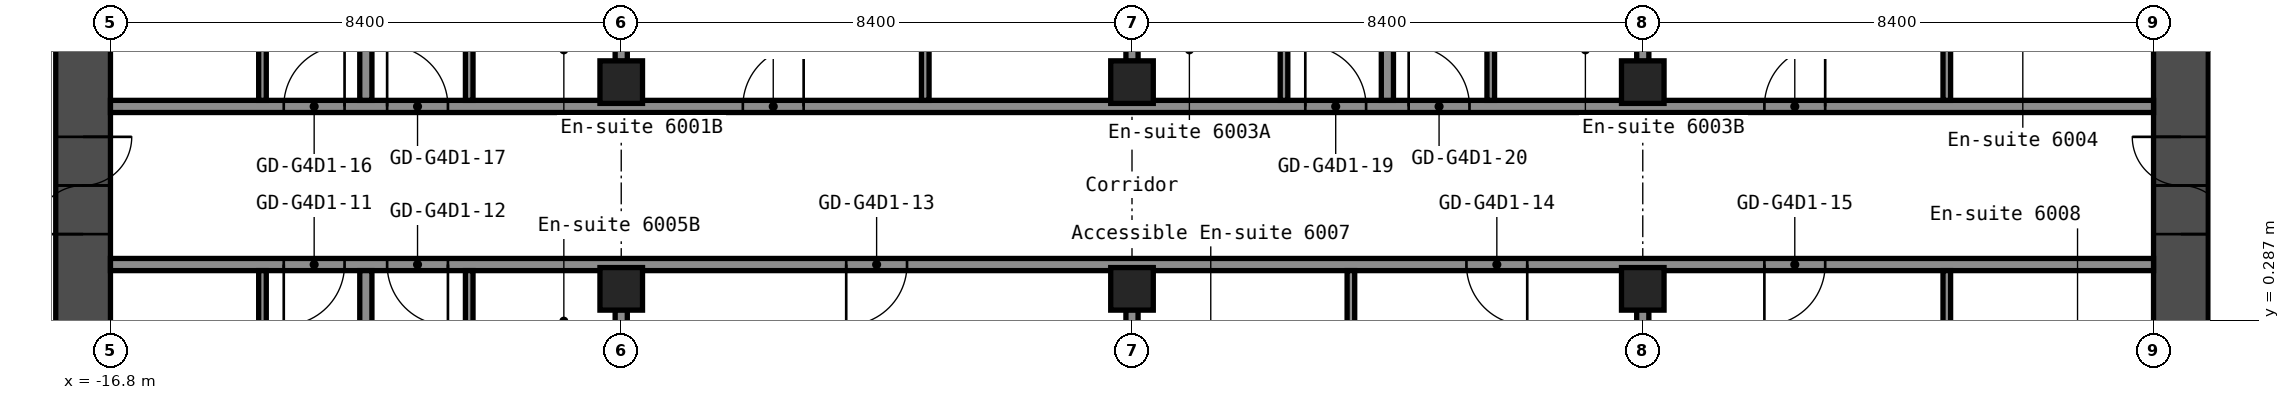
"""IFC4 building model, lengths in metres.
Left out: names, types, materials, properties, quantities, classifications, styles, units other than length and angle.
Written with IfcOpenShell. Run it as: python <this file> out.ifc"""

import sys

from ifc_helpers import new_model, si_unit, direction, frame, frame_2d, origin, origin_2d, place, context, subcontext, project, spatial, rectangle, hollow_rectangle, extrude, element, fill, save


model = new_model("IFC4")
c1 = context("Model", 3, precision=1e-05, world=origin(), true_north=direction((0.0, 1.0)))
c2 = subcontext(c1, "Body", "Model", "MODEL_VIEW")
j1 = project(units=[si_unit("LENGTHUNIT", "METRE"), si_unit("PLANEANGLEUNIT", "RADIAN")], contexts=[c1])
p1 = place(None, origin())
s1 = spatial("IfcSite", under=j1, at=p1, CompositionType="ELEMENT")
p2 = place(p1, origin())
s2 = spatial("IfcBuilding", under=s1, at=p2, CompositionType="ELEMENT")
p3 = place(p2, frame((0.0, 0.0, 212.2)))
s3 = spatial("IfcBuildingStorey", under=s2, at=p3, CompositionType="ELEMENT", Elevation=212.2)
for number, where, z_axis, x_axis in (
    (1, (-8.4, 0.8, 0.0), (0.0, 0.0, 1.0), (1.0, 0.0, 0.0)),
    (2, (-8.4, 4.2, 0.0), (0.0, 0.0, 1.0), (1.0, 0.0, 0.0)),
    (3, (0.0, 0.8, 0.0), (0.0, 0.0, 1.0), (1.0, 0.0, 0.0)),
    (4, (0.0, 4.2, 0.0), (0.0, 0.0, 1.0), (1.0, 0.0, 0.0)),
    (5, (8.4, 0.8, 0.0), (0.0, 0.0, 1.0), (1.0, 0.0, 0.0)),
    (6, (8.4, 4.2, 0.0), (0.0, 0.0, 1.0), (1.0, 0.0, 0.0)),
):
    element("IfcColumn", number, at=place(p3, frame(where, z_axis=z_axis, x_axis=x_axis)), inside=s3, PredefinedType="COLUMN", context=c2, shape_type="SweptSolid", body=[
        extrude(hollow_rectangle(XDim=0.7, YDim=0.7, WallThickness=0.028, at=origin_2d()), origin(), (0.0, 0.0, 1.0), 2.75),
    ])
p4 = place(p3, frame((-17.25, -8.4, 0.0), z_axis=(0.0, 0.0, 1.0), x_axis=(0.0, 1.0, 0.0)))
e7 = element("IfcWall", 7, at=p4, inside=s3, PredefinedType="SHEAR", context=c2, shape_type="SweptSolid", body=[
    extrude(rectangle(XDim=16.8, YDim=0.9, at=frame_2d((8.4, 0.0))), origin(), (0.0, 0.0, 1.0), 2.75),
])
p5 = place(p4, frame((10.1, 0.0, 0.0)))
e8 = element("IfcOpeningElement", 8, at=p5, cuts=e7, PredefinedType="OPENING", context=c2, shape_type="SweptSolid", body=[
    extrude(rectangle(XDim=1.6, YDim=2.1, at=frame_2d((0.8, 1.05))), frame((0.0, 0.46, 0.0), z_axis=(0.0, -1.0, 0.0), x_axis=(1.0, 0.0, 0.0)), (0.0, 0.0, 1.0), 0.92),
])
p6 = place(p3, frame((17.25, -8.4, 0.0), z_axis=(0.0, 0.0, 1.0), x_axis=(0.0, 1.0, 0.0)))
e9 = element("IfcWall", 9, at=p6, inside=s3, PredefinedType="SHEAR", context=c2, shape_type="SweptSolid", body=[
    extrude(rectangle(XDim=16.8, YDim=0.9, at=frame_2d((8.4, 0.0))), origin(), (0.0, 0.0, 1.0), 2.75),
])
p7 = place(p6, frame((10.1, 0.0, 0.0)))
e10 = element("IfcOpeningElement", 10, at=p7, cuts=e9, PredefinedType="OPENING", context=c2, shape_type="SweptSolid", body=[
    extrude(rectangle(XDim=1.6, YDim=2.1, at=frame_2d((0.8, 1.05))), frame((0.0, 0.46, 0.0), z_axis=(0.0, -1.0, 0.0), x_axis=(1.0, 0.0, 0.0)), (0.0, 0.0, 1.0), 0.92),
])
p8 = place(p3, frame((-16.8, 1.2, 0.0), z_axis=(0.0, 0.0, 1.0), x_axis=(1.0, 0.0, 0.0)))
e11 = element("IfcWall", 11, at=p8, inside=s3, PredefinedType="PARTITIONING", context=c2, shape_type="SweptSolid", body=[
    extrude(rectangle(XDim=33.6, YDim=0.2, at=frame_2d((16.8, 0.0))), origin(), (0.0, 0.0, 1.0), 2.75),
])
p9 = place(p8, frame((2.85, 0.0, 0.0)))
e12 = element("IfcOpeningElement", 12, at=p9, cuts=e11, PredefinedType="OPENING", context=c2, shape_type="SweptSolid", body=[
    extrude(rectangle(XDim=1.0, YDim=2.1, at=frame_2d((0.5, 1.05))), frame((0.0, 0.11, 0.0), z_axis=(0.0, -1.0, 0.0), x_axis=(1.0, 0.0, 0.0)), (0.0, 0.0, 1.0), 0.22),
])
p10 = place(p8, frame((4.55, 0.0, 0.0)))
e13 = element("IfcOpeningElement", 13, at=p10, cuts=e11, PredefinedType="OPENING", context=c2, shape_type="SweptSolid", body=[
    extrude(rectangle(XDim=1.0, YDim=2.1, at=frame_2d((0.5, 1.05))), frame((0.0, 0.11, 0.0), z_axis=(0.0, -1.0, 0.0), x_axis=(1.0, 0.0, 0.0)), (0.0, 0.0, 1.0), 0.22),
])
p11 = place(p8, frame((12.1, 0.0, 0.0)))
e14 = element("IfcOpeningElement", 14, at=p11, cuts=e11, PredefinedType="OPENING", context=c2, shape_type="SweptSolid", body=[
    extrude(rectangle(XDim=1.0, YDim=2.1, at=frame_2d((0.5, 1.05))), frame((0.0, 0.11, 0.0), z_axis=(0.0, -1.0, 0.0), x_axis=(1.0, 0.0, 0.0)), (0.0, 0.0, 1.0), 0.22),
])
p12 = place(p8, frame((22.3, 0.0, 0.0)))
e15 = element("IfcOpeningElement", 15, at=p12, cuts=e11, PredefinedType="OPENING", context=c2, shape_type="SweptSolid", body=[
    extrude(rectangle(XDim=1.0, YDim=2.1, at=frame_2d((0.5, 1.05))), frame((0.0, 0.11, 0.0), z_axis=(0.0, -1.0, 0.0), x_axis=(1.0, 0.0, 0.0)), (0.0, 0.0, 1.0), 0.22),
])
p13 = place(p8, frame((27.2, 0.0, 0.0)))
e16 = element("IfcOpeningElement", 16, at=p13, cuts=e11, PredefinedType="OPENING", context=c2, shape_type="SweptSolid", body=[
    extrude(rectangle(XDim=1.0, YDim=2.1, at=frame_2d((0.5, 1.05))), frame((0.0, 0.11, 0.0), z_axis=(0.0, -1.0, 0.0), x_axis=(1.0, 0.0, 0.0)), (0.0, 0.0, 1.0), 0.22),
])
p14 = place(p3, frame((-16.8, 3.8, 0.0), z_axis=(0.0, 0.0, 1.0), x_axis=(1.0, 0.0, 0.0)))
e17 = element("IfcWall", 17, at=p14, inside=s3, PredefinedType="PARTITIONING", context=c2, shape_type="SweptSolid", body=[
    extrude(rectangle(XDim=33.6, YDim=0.2, at=frame_2d((16.8, 0.0))), origin(), (0.0, 0.0, 1.0), 2.75),
])
p15 = place(p14, frame((2.85, 0.0, 0.0)))
e18 = element("IfcOpeningElement", 18, at=p15, cuts=e17, PredefinedType="OPENING", context=c2, shape_type="SweptSolid", body=[
    extrude(rectangle(XDim=1.0, YDim=2.1, at=frame_2d((0.5, 1.05))), frame((0.0, 0.11, 0.0), z_axis=(0.0, -1.0, 0.0), x_axis=(1.0, 0.0, 0.0)), (0.0, 0.0, 1.0), 0.22),
])
p16 = place(p14, frame((4.55, 0.0, 0.0)))
e19 = element("IfcOpeningElement", 19, at=p16, cuts=e17, PredefinedType="OPENING", context=c2, shape_type="SweptSolid", body=[
    extrude(rectangle(XDim=1.0, YDim=2.1, at=frame_2d((0.5, 1.05))), frame((0.0, 0.11, 0.0), z_axis=(0.0, -1.0, 0.0), x_axis=(1.0, 0.0, 0.0)), (0.0, 0.0, 1.0), 0.22),
])
p17 = place(p14, frame((10.4, 0.0, 0.0)))
e20 = element("IfcOpeningElement", 20, at=p17, cuts=e17, PredefinedType="OPENING", context=c2, shape_type="SweptSolid", body=[
    extrude(rectangle(XDim=1.0, YDim=2.1, at=frame_2d((0.5, 1.05))), frame((0.0, 0.11, 0.0), z_axis=(0.0, -1.0, 0.0), x_axis=(1.0, 0.0, 0.0)), (0.0, 0.0, 1.0), 0.22),
])
p18 = place(p14, frame((19.65, 0.0, 0.0)))
e21 = element("IfcOpeningElement", 21, at=p18, cuts=e17, PredefinedType="OPENING", context=c2, shape_type="SweptSolid", body=[
    extrude(rectangle(XDim=1.0, YDim=2.1, at=frame_2d((0.5, 1.05))), frame((0.0, 0.11, 0.0), z_axis=(0.0, -1.0, 0.0), x_axis=(1.0, 0.0, 0.0)), (0.0, 0.0, 1.0), 0.22),
])
p19 = place(p14, frame((21.35, 0.0, 0.0)))
e22 = element("IfcOpeningElement", 22, at=p19, cuts=e17, PredefinedType="OPENING", context=c2, shape_type="SweptSolid", body=[
    extrude(rectangle(XDim=1.0, YDim=2.1, at=frame_2d((0.5, 1.05))), frame((0.0, 0.11, 0.0), z_axis=(0.0, -1.0, 0.0), x_axis=(1.0, 0.0, 0.0)), (0.0, 0.0, 1.0), 0.22),
])
p20 = place(p14, frame((27.2, 0.0, 0.0)))
e23 = element("IfcOpeningElement", 23, at=p20, cuts=e17, PredefinedType="OPENING", context=c2, shape_type="SweptSolid", body=[
    extrude(rectangle(XDim=1.0, YDim=2.1, at=frame_2d((0.5, 1.05))), frame((0.0, 0.11, 0.0), z_axis=(0.0, -1.0, 0.0), x_axis=(1.0, 0.0, 0.0)), (0.0, 0.0, 1.0), 0.22),
])
p21 = place(p3, frame((-14.3, -1.8, 0.0), z_axis=(0.0, 0.0, 1.0), x_axis=(0.0, 1.0, 0.0)))
e24 = element("IfcWall", 24, at=p21, inside=s3, PredefinedType="PARTITIONING", context=c2, shape_type="SweptSolid", body=[
    extrude(rectangle(XDim=2.9, YDim=0.125, at=frame_2d((1.45, 0.0))), origin(), (0.0, 0.0, 1.0), 2.75),
])
p22 = place(p21, frame((0.6, 0.0, 0.0)))
e25 = element("IfcOpeningElement", 25, at=p22, cuts=e24, PredefinedType="OPENING", context=c2, shape_type="SweptSolid", body=[
    extrude(rectangle(XDim=0.8, YDim=2.1, at=frame_2d((0.4, 1.05))), frame((0.0, 0.073, 0.0), z_axis=(0.0, -1.0, 0.0), x_axis=(1.0, 0.0, 0.0)), (0.0, 0.0, 1.0), 0.145),
])
p23 = place(p3, frame((-14.3, 3.9, 0.0), z_axis=(0.0, 0.0, 1.0), x_axis=(0.0, 1.0, 0.0)))
e26 = element("IfcWall", 26, at=p23, inside=s3, PredefinedType="PARTITIONING", context=c2, shape_type="SweptSolid", body=[
    extrude(rectangle(XDim=2.9, YDim=0.125, at=frame_2d((1.45, 0.0))), origin(), (0.0, 0.0, 1.0), 2.75),
])
p24 = place(p23, frame((1.5, 0.0, 0.0)))
e27 = element("IfcOpeningElement", 27, at=p24, cuts=e26, PredefinedType="OPENING", context=c2, shape_type="SweptSolid", body=[
    extrude(rectangle(XDim=0.8, YDim=2.1, at=frame_2d((0.4, 1.05))), frame((0.0, 0.073, 0.0), z_axis=(0.0, -1.0, 0.0), x_axis=(1.0, 0.0, 0.0)), (0.0, 0.0, 1.0), 0.145),
])
for number, where, z_axis, x_axis in (
    (28, (-12.6, -15.55, 0.0), (0.0, 0.0, 1.0), (0.0, 1.0, 0.0)),
    (29, (-12.6, 3.9, 0.0), (0.0, 0.0, 1.0), (0.0, 1.0, 0.0)),
):
    element("IfcWall", number, at=place(p3, frame(where, z_axis=z_axis, x_axis=x_axis)), inside=s3, PredefinedType="PARTITIONING", context=c2, shape_type="SweptSolid", body=[
        extrude(rectangle(XDim=16.65, YDim=0.2, at=frame_2d((8.325, 0.0))), origin(), (0.0, 0.0, 1.0), 2.75),
    ])
p25 = place(p3, frame((-10.9, -1.8, 0.0), z_axis=(0.0, 0.0, 1.0), x_axis=(0.0, 1.0, 0.0)))
e30 = element("IfcWall", 30, at=p25, inside=s3, PredefinedType="PARTITIONING", context=c2, shape_type="SweptSolid", body=[
    extrude(rectangle(XDim=2.9, YDim=0.125, at=frame_2d((1.45, 0.0))), origin(), (0.0, 0.0, 1.0), 2.75),
])
p26 = place(p25, frame((0.6, 0.0, 0.0)))
e31 = element("IfcOpeningElement", 31, at=p26, cuts=e30, PredefinedType="OPENING", context=c2, shape_type="SweptSolid", body=[
    extrude(rectangle(XDim=0.8, YDim=2.1, at=frame_2d((0.4, 1.05))), frame((0.0, 0.073, 0.0), z_axis=(0.0, -1.0, 0.0), x_axis=(1.0, 0.0, 0.0)), (0.0, 0.0, 1.0), 0.145),
])
p27 = place(p3, frame((-10.9, 3.9, 0.0), z_axis=(0.0, 0.0, 1.0), x_axis=(0.0, 1.0, 0.0)))
e32 = element("IfcWall", 32, at=p27, inside=s3, PredefinedType="PARTITIONING", context=c2, shape_type="SweptSolid", body=[
    extrude(rectangle(XDim=2.9, YDim=0.125, at=frame_2d((1.45, 0.0))), origin(), (0.0, 0.0, 1.0), 2.75),
])
p28 = place(p27, frame((1.5, 0.0, 0.0)))
e33 = element("IfcOpeningElement", 33, at=p28, cuts=e32, PredefinedType="OPENING", context=c2, shape_type="SweptSolid", body=[
    extrude(rectangle(XDim=0.8, YDim=2.1, at=frame_2d((0.4, 1.05))), frame((0.0, 0.073, 0.0), z_axis=(0.0, -1.0, 0.0), x_axis=(1.0, 0.0, 0.0)), (0.0, 0.0, 1.0), 0.145),
])
for number, where, z_axis, x_axis in (
    (34, (-8.4, -15.55, 0.0), (0.0, 0.0, 1.0), (0.0, 1.0, 0.0)),
    (35, (-8.4, 4.54, 0.0), (0.0, 0.0, 1.0), (0.0, 1.0, 0.0)),
):
    element("IfcWall", number, at=place(p3, frame(where, z_axis=z_axis, x_axis=x_axis)), inside=s3, PredefinedType="PARTITIONING", context=c2, shape_type="SweptSolid", body=[
        extrude(rectangle(XDim=16.01, YDim=0.2, at=frame_2d((8.005, 0.0))), origin(), (0.0, 0.0, 1.0), 2.75),
    ])
p29 = place(p3, frame((-3.4, 3.9, 0.0), z_axis=(0.0, 0.0, 1.0), x_axis=(0.0, 1.0, 0.0)))
e36 = element("IfcWall", 36, at=p29, inside=s3, PredefinedType="PARTITIONING", context=c2, shape_type="SweptSolid", body=[
    extrude(rectangle(XDim=3.3, YDim=0.125, at=frame_2d((1.65, 0.0))), origin(), (0.0, 0.0, 1.0), 2.75),
])
for number, where, z_axis, x_axis in (
    (37, (0.0, -15.55, 0.0), (0.0, 0.0, 1.0), (0.0, 1.0, 0.0)),
    (38, (0.0, 4.54, 0.0), (0.0, 0.0, 1.0), (0.0, 1.0, 0.0)),
):
    element("IfcWall", number, at=place(p3, frame(where, z_axis=z_axis, x_axis=x_axis)), inside=s3, PredefinedType="PARTITIONING", context=c2, shape_type="SweptSolid", body=[
        extrude(rectangle(XDim=16.01, YDim=0.2, at=frame_2d((8.005, 0.0))), origin(), (0.0, 0.0, 1.0), 2.75),
    ])
p30 = place(p3, frame((2.5, 3.9, 0.0), z_axis=(0.0, 0.0, 1.0), x_axis=(0.0, 1.0, 0.0)))
e39 = element("IfcWall", 39, at=p30, inside=s3, PredefinedType="PARTITIONING", context=c2, shape_type="SweptSolid", body=[
    extrude(rectangle(XDim=2.9, YDim=0.125, at=frame_2d((1.45, 0.0))), origin(), (0.0, 0.0, 1.0), 2.75),
])
p31 = place(p30, frame((1.5, 0.0, 0.0)))
e40 = element("IfcOpeningElement", 40, at=p31, cuts=e39, PredefinedType="OPENING", context=c2, shape_type="SweptSolid", body=[
    extrude(rectangle(XDim=0.8, YDim=2.1, at=frame_2d((0.4, 1.05))), frame((0.0, 0.073, 0.0), z_axis=(0.0, -1.0, 0.0), x_axis=(1.0, 0.0, 0.0)), (0.0, 0.0, 1.0), 0.145),
])
p32 = place(p3, frame((3.6, -2.2, 0.0), z_axis=(0.0, 0.0, 1.0), x_axis=(0.0, 1.0, 0.0)))
e41 = element("IfcWall", 41, at=p32, inside=s3, PredefinedType="PARTITIONING", context=c2, shape_type="SweptSolid", body=[
    extrude(rectangle(XDim=3.3, YDim=0.125, at=frame_2d((1.65, 0.0))), origin(), (0.0, 0.0, 1.0), 2.75),
])
p33 = place(p32, frame((1.2, 0.0, 0.0)))
e42 = element("IfcOpeningElement", 42, at=p33, cuts=e41, PredefinedType="OPENING", context=c2, shape_type="SweptSolid", body=[
    extrude(rectangle(XDim=1.0, YDim=2.1, at=frame_2d((0.5, 1.05))), frame((0.0, 0.073, 0.0), z_axis=(0.0, -1.0, 0.0), x_axis=(1.0, 0.0, 0.0)), (0.0, 0.0, 1.0), 0.145),
])
p34 = place(p3, frame((4.2, 3.9, 0.0), z_axis=(0.0, 0.0, 1.0), x_axis=(0.0, 1.0, 0.0)))
e43 = element("IfcWall", 43, at=p34, inside=s3, PredefinedType="PARTITIONING", context=c2, shape_type="SweptSolid", body=[
    extrude(rectangle(XDim=16.65, YDim=0.2, at=frame_2d((8.325, 0.0))), origin(), (0.0, 0.0, 1.0), 2.75),
])
p35 = place(p3, frame((5.9, 3.9, 0.0), z_axis=(0.0, 0.0, 1.0), x_axis=(0.0, 1.0, 0.0)))
e44 = element("IfcWall", 44, at=p35, inside=s3, PredefinedType="PARTITIONING", context=c2, shape_type="SweptSolid", body=[
    extrude(rectangle(XDim=2.9, YDim=0.125, at=frame_2d((1.45, 0.0))), origin(), (0.0, 0.0, 1.0), 2.75),
])
p36 = place(p35, frame((1.5, 0.0, 0.0)))
e45 = element("IfcOpeningElement", 45, at=p36, cuts=e44, PredefinedType="OPENING", context=c2, shape_type="SweptSolid", body=[
    extrude(rectangle(XDim=0.8, YDim=2.1, at=frame_2d((0.4, 1.05))), frame((0.0, 0.073, 0.0), z_axis=(0.0, -1.0, 0.0), x_axis=(1.0, 0.0, 0.0)), (0.0, 0.0, 1.0), 0.145),
])
for number, where, z_axis, x_axis in (
    (46, (8.4, -15.55, 0.0), (0.0, 0.0, 1.0), (0.0, 1.0, 0.0)),
    (47, (8.4, 4.54, 0.0), (0.0, 0.0, 1.0), (0.0, 1.0, 0.0)),
):
    element("IfcWall", number, at=place(p3, frame(where, z_axis=z_axis, x_axis=x_axis)), inside=s3, PredefinedType="PARTITIONING", context=c2, shape_type="SweptSolid", body=[
        extrude(rectangle(XDim=16.01, YDim=0.2, at=frame_2d((8.005, 0.0))), origin(), (0.0, 0.0, 1.0), 2.75),
    ])
for number, where, z_axis, x_axis in (
    (48, (13.4, -2.2, 0.0), (0.0, 0.0, 1.0), (0.0, 1.0, 0.0)),
    (49, (13.4, 3.9, 0.0), (0.0, 0.0, 1.0), (0.0, 1.0, 0.0)),
):
    element("IfcWall", number, at=place(p3, frame(where, z_axis=z_axis, x_axis=x_axis)), inside=s3, PredefinedType="PARTITIONING", context=c2, shape_type="SweptSolid", body=[
        extrude(rectangle(XDim=3.3, YDim=0.125, at=frame_2d((1.65, 0.0))), origin(), (0.0, 0.0, 1.0), 2.75),
    ])
p37 = place(p5, origin())
e50 = element("IfcDoor", 50, at=p37, inside=s3, OperationType="DOUBLE_DOOR_SINGLE_SWING", PredefinedType="DOOR", context=c2, shape_type="SweptSolid", body=[
    extrude(rectangle(XDim=1.6, YDim=2.1, at=frame_2d((0.8, 1.05))), frame((0.0, 0.025, 0.0), z_axis=(0.0, -1.0, 0.0), x_axis=(1.0, 0.0, 0.0)), (0.0, 0.0, 1.0), 0.05),
])
fill(e8, e50)
p38 = place(p7, origin())
e51 = element("IfcDoor", 51, at=p38, inside=s3, OperationType="DOUBLE_DOOR_SINGLE_SWING", PredefinedType="DOOR", context=c2, shape_type="SweptSolid", body=[
    extrude(rectangle(XDim=1.6, YDim=2.1, at=frame_2d((0.8, 1.05))), frame((0.0, 0.025, 0.0), z_axis=(0.0, -1.0, 0.0), x_axis=(1.0, 0.0, 0.0)), (0.0, 0.0, 1.0), 0.05),
])
fill(e10, e51)
p39 = place(p9, origin())
e52 = element("IfcDoor", 52, at=p39, inside=s3, OperationType="SINGLE_SWING_LEFT", PredefinedType="DOOR", context=c2, shape_type="SweptSolid", body=[
    extrude(rectangle(XDim=1.0, YDim=2.1, at=frame_2d((0.5, 1.05))), frame((0.0, 0.025, 0.0), z_axis=(0.0, -1.0, 0.0), x_axis=(1.0, 0.0, 0.0)), (0.0, 0.0, 1.0), 0.05),
])
fill(e12, e52)
p40 = place(p10, origin())
e53 = element("IfcDoor", 53, at=p40, inside=s3, OperationType="SINGLE_SWING_RIGHT", PredefinedType="DOOR", context=c2, shape_type="SweptSolid", body=[
    extrude(rectangle(XDim=1.0, YDim=2.1, at=frame_2d((0.5, 1.05))), frame((0.0, 0.025, 0.0), z_axis=(0.0, -1.0, 0.0), x_axis=(1.0, 0.0, 0.0)), (0.0, 0.0, 1.0), 0.05),
])
fill(e13, e53)
p41 = place(p11, origin())
e54 = element("IfcDoor", 54, at=p41, inside=s3, OperationType="SINGLE_SWING_LEFT", PredefinedType="DOOR", context=c2, shape_type="SweptSolid", body=[
    extrude(rectangle(XDim=1.0, YDim=2.1, at=frame_2d((0.5, 1.05))), frame((0.0, 0.025, 0.0), z_axis=(0.0, -1.0, 0.0), x_axis=(1.0, 0.0, 0.0)), (0.0, 0.0, 1.0), 0.05),
])
fill(e14, e54)
p42 = place(p12, origin())
e55 = element("IfcDoor", 55, at=p42, inside=s3, OperationType="SINGLE_SWING_RIGHT", PredefinedType="DOOR", context=c2, shape_type="SweptSolid", body=[
    extrude(rectangle(XDim=1.0, YDim=2.1, at=frame_2d((0.5, 1.05))), frame((0.0, 0.025, 0.0), z_axis=(0.0, -1.0, 0.0), x_axis=(1.0, 0.0, 0.0)), (0.0, 0.0, 1.0), 0.05),
])
fill(e15, e55)
p43 = place(p13, origin())
e56 = element("IfcDoor", 56, at=p43, inside=s3, OperationType="SINGLE_SWING_LEFT", PredefinedType="DOOR", context=c2, shape_type="SweptSolid", body=[
    extrude(rectangle(XDim=1.0, YDim=2.1, at=frame_2d((0.5, 1.05))), frame((0.0, 0.025, 0.0), z_axis=(0.0, -1.0, 0.0), x_axis=(1.0, 0.0, 0.0)), (0.0, 0.0, 1.0), 0.05),
])
fill(e16, e56)
p44 = place(p15, origin())
e57 = element("IfcDoor", 57, at=p44, inside=s3, OperationType="SINGLE_SWING_LEFT", PredefinedType="DOOR", context=c2, shape_type="SweptSolid", body=[
    extrude(rectangle(XDim=1.0, YDim=2.1, at=frame_2d((0.5, 1.05))), frame((0.0, 0.025, 0.0), z_axis=(0.0, -1.0, 0.0), x_axis=(1.0, 0.0, 0.0)), (0.0, 0.0, 1.0), 0.05),
])
fill(e18, e57)
p45 = place(p16, origin())
e58 = element("IfcDoor", 58, at=p45, inside=s3, OperationType="SINGLE_SWING_RIGHT", PredefinedType="DOOR", context=c2, shape_type="SweptSolid", body=[
    extrude(rectangle(XDim=1.0, YDim=2.1, at=frame_2d((0.5, 1.05))), frame((0.0, 0.025, 0.0), z_axis=(0.0, -1.0, 0.0), x_axis=(1.0, 0.0, 0.0)), (0.0, 0.0, 1.0), 0.05),
])
fill(e19, e58)
p46 = place(p17, origin())
e59 = element("IfcDoor", 59, at=p46, inside=s3, OperationType="SINGLE_SWING_LEFT", PredefinedType="DOOR", context=c2, shape_type="SweptSolid", body=[
    extrude(rectangle(XDim=1.0, YDim=2.1, at=frame_2d((0.5, 1.05))), frame((0.0, 0.025, 0.0), z_axis=(0.0, -1.0, 0.0), x_axis=(1.0, 0.0, 0.0)), (0.0, 0.0, 1.0), 0.05),
])
fill(e20, e59)
p47 = place(p18, origin())
e60 = element("IfcDoor", 60, at=p47, inside=s3, OperationType="SINGLE_SWING_RIGHT", PredefinedType="DOOR", context=c2, shape_type="SweptSolid", body=[
    extrude(rectangle(XDim=1.0, YDim=2.1, at=frame_2d((0.5, 1.05))), frame((0.0, 0.025, 0.0), z_axis=(0.0, -1.0, 0.0), x_axis=(1.0, 0.0, 0.0)), (0.0, 0.0, 1.0), 0.05),
])
fill(e21, e60)
p48 = place(p19, origin())
e61 = element("IfcDoor", 61, at=p48, inside=s3, OperationType="SINGLE_SWING_RIGHT", PredefinedType="DOOR", context=c2, shape_type="SweptSolid", body=[
    extrude(rectangle(XDim=1.0, YDim=2.1, at=frame_2d((0.5, 1.05))), frame((0.0, 0.025, 0.0), z_axis=(0.0, -1.0, 0.0), x_axis=(1.0, 0.0, 0.0)), (0.0, 0.0, 1.0), 0.05),
])
fill(e22, e61)
p49 = place(p20, origin())
e62 = element("IfcDoor", 62, at=p49, inside=s3, OperationType="SINGLE_SWING_LEFT", PredefinedType="DOOR", context=c2, shape_type="SweptSolid", body=[
    extrude(rectangle(XDim=1.0, YDim=2.1, at=frame_2d((0.5, 1.05))), frame((0.0, 0.025, 0.0), z_axis=(0.0, -1.0, 0.0), x_axis=(1.0, 0.0, 0.0)), (0.0, 0.0, 1.0), 0.05),
])
fill(e23, e62)
save(model, sys.argv[1])
